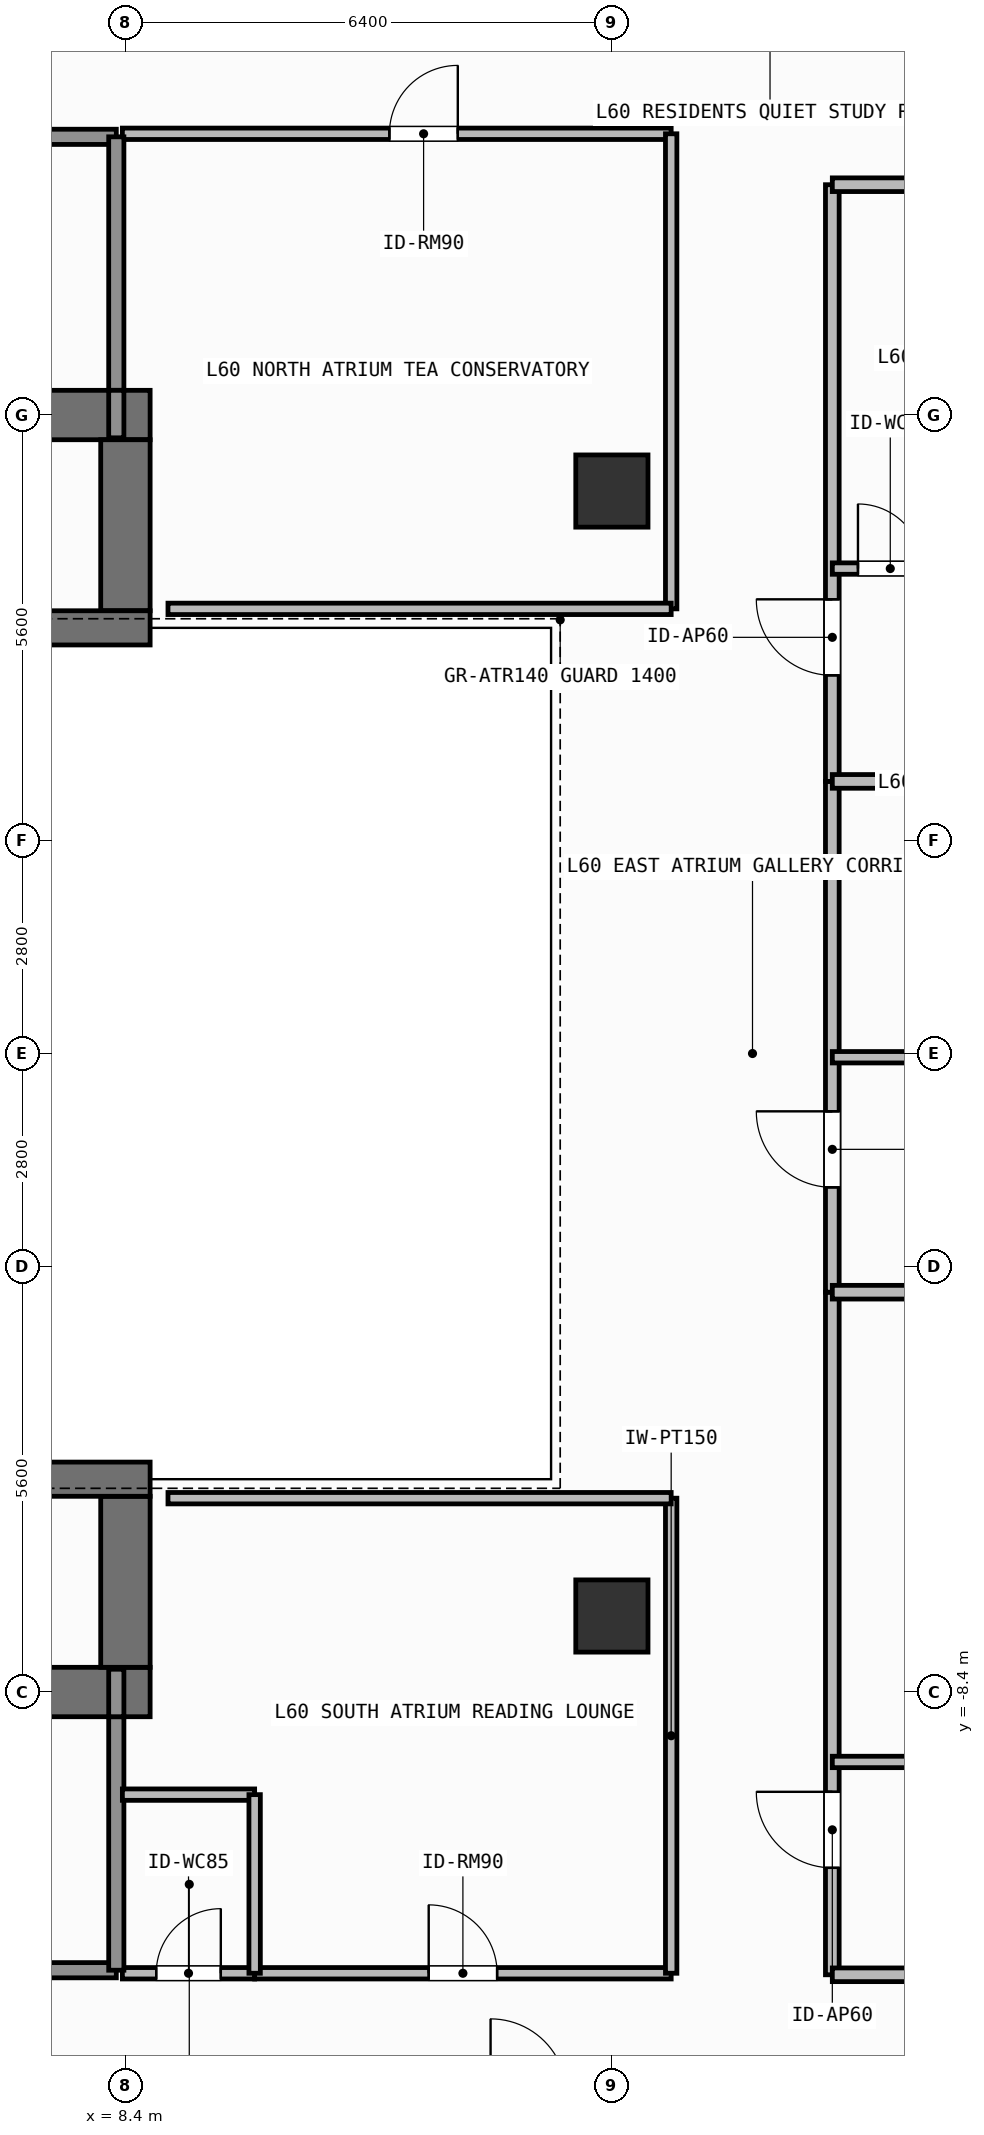
"""IFC4 building model, lengths in metres.
Left out: names, types, materials, properties, quantities, classifications, styles, units other than length and angle.
Written with IfcOpenShell. Run it as: python <this file> out.ifc"""

import sys

from ifc_helpers import new_model, si_unit, direction, frame, frame_2d, origin, origin_2d, place, context, subcontext, project, spatial, rectangle, extrude, element, fill, save


model = new_model("IFC4")
c1 = context("Model", 3, precision=1e-05, world=origin(), true_north=direction((0.0, 1.0)))
c2 = subcontext(c1, "Body", "Model", "MODEL_VIEW")
j1 = project(units=[si_unit("LENGTHUNIT", "METRE"), si_unit("PLANEANGLEUNIT", "RADIAN")], contexts=[c1])
p1 = place(None, origin())
s1 = spatial("IfcSite", under=j1, at=p1, CompositionType="ELEMENT")
p2 = place(p1, origin())
s2 = spatial("IfcBuilding", under=s1, at=p2, CompositionType="ELEMENT")
p3 = place(p2, frame((0.0, 0.0, 246.9)))
s3 = spatial("IfcBuildingStorey", under=s2, at=p3, CompositionType="ELEMENT", Elevation=246.9)
p4 = place(p3, frame((6.12, -8.4, 0.0), z_axis=(0.0, 0.0, 1.0), x_axis=(1.0, 0.0, 0.0)))
e1 = element("IfcWall", 1, at=p4, inside=s3, PredefinedType="SHEAR", context=c2, shape_type="SweptSolid", body=[
    extrude(rectangle(XDim=2.605, YDim=0.65, at=frame_2d((1.302, 0.0))), origin(), (0.0, 0.0, 1.0), 3.9),
])
p5 = place(p3, frame((-7.55, 8.4, 0.0), z_axis=(0.0, 0.0, 1.0), x_axis=(1.0, 0.0, 0.0)))
e2 = element("IfcWall", 2, at=p5, inside=s3, PredefinedType="SHEAR", context=c2, shape_type="SweptSolid", body=[
    extrude(rectangle(XDim=16.275, YDim=0.65, at=frame_2d((8.138, 0.0))), origin(), (0.0, 0.0, 1.0), 3.9),
])
for number, where, z_axis, x_axis in (
    (3, (8.4, -8.075, 0.0), (0.0, 0.0, 1.0), (0.0, 1.0, 0.0)),
    (4, (8.4, 5.825, 0.0), (0.0, 0.0, 1.0), (0.0, 1.0, 0.0)),
):
    element("IfcWall", number, at=place(p3, frame(where, z_axis=z_axis, x_axis=x_axis)), inside=s3, PredefinedType="SHEAR", context=c2, shape_type="SweptSolid", body=[
        extrude(rectangle(XDim=2.25, YDim=0.65, at=frame_2d((1.125, 0.0))), origin(), (0.0, 0.0, 1.0), 3.9),
    ])
for number, where, z_axis, x_axis in (
    (5, (3.045, -5.6, 0.0), (0.0, 0.0, 1.0), (1.0, 0.0, 0.0)),
    (6, (3.045, 5.6, 0.0), (0.0, 0.0, 1.0), (1.0, 0.0, 0.0)),
):
    element("IfcWall", number, at=place(p3, frame(where, z_axis=z_axis, x_axis=x_axis)), inside=s3, PredefinedType="SHEAR", context=c2, shape_type="SweptSolid", body=[
        extrude(rectangle(XDim=5.68, YDim=0.45, at=frame_2d((2.84, 0.0))), origin(), (0.0, 0.0, 1.0), 3.9),
    ])
for number, where, z_axis, x_axis in (
    (7, (14.8, -7.4, 0.0), (0.0, 0.0, 1.0), (1.0, 0.0, 0.0)),
    (8, (14.8, 7.4, 0.0), (0.0, 0.0, 1.0), (1.0, 0.0, 0.0)),
):
    element("IfcColumn", number, at=place(p3, frame(where, z_axis=z_axis, x_axis=x_axis)), inside=s3, PredefinedType="COLUMN", context=c2, shape_type="SweptSolid", body=[
        extrude(rectangle(XDim=0.95, YDim=0.95, at=origin_2d()), origin(), (0.0, 0.0, 1.0), 3.9),
    ])
p6 = place(p3, frame((4.58, -12.06, 0.0), z_axis=(0.0, 0.0, 1.0), x_axis=(1.0, 0.0, 0.0)))
e9 = element("IfcWall", 9, at=p6, inside=s3, PredefinedType="SOLIDWALL", context=c2, shape_type="SweptSolid", body=[
    extrude(rectangle(XDim=3.7, YDim=0.2, at=frame_2d((1.85, 0.0))), origin(), (0.0, 0.0, 1.0), 3.68),
])
p7 = place(p6, frame((1.212, 0.0, 0.0)))
e10 = element("IfcOpeningElement", 10, at=p7, cuts=e9, PredefinedType="OPENING", context=c2, shape_type="SweptSolid", body=[
    extrude(rectangle(XDim=1.1, YDim=2.15, at=frame_2d((0.55, 1.075))), frame((0.0, 0.11, 0.0), z_axis=(0.0, -1.0, 0.0), x_axis=(1.0, 0.0, 0.0)), (0.0, 0.0, 1.0), 0.22),
])
p8 = place(p3, frame((4.58, 12.06, 0.0), z_axis=(0.0, 0.0, 1.0), x_axis=(1.0, 0.0, 0.0)))
e11 = element("IfcWall", 11, at=p8, inside=s3, PredefinedType="SOLIDWALL", context=c2, shape_type="SweptSolid", body=[
    extrude(rectangle(XDim=3.7, YDim=0.2, at=frame_2d((1.85, 0.0))), origin(), (0.0, 0.0, 1.0), 3.68),
])
p9 = place(p8, frame((1.212, 0.0, 0.0)))
e12 = element("IfcOpeningElement", 12, at=p9, cuts=e11, PredefinedType="OPENING", context=c2, shape_type="SweptSolid", body=[
    extrude(rectangle(XDim=1.1, YDim=2.15, at=frame_2d((0.55, 1.075))), frame((0.0, 0.11, 0.0), z_axis=(0.0, -1.0, 0.0), x_axis=(1.0, 0.0, 0.0)), (0.0, 0.0, 1.0), 0.22),
])
p10 = place(p3, frame((8.36, -12.1, 0.0), z_axis=(0.0, 0.0, 1.0), x_axis=(1.0, 0.0, 0.0)))
e13 = element("IfcWall", 13, at=p10, inside=s3, PredefinedType="PARTITIONING", context=c2, shape_type="SweptSolid", body=[
    extrude(rectangle(XDim=1.74, YDim=0.15, at=frame_2d((0.87, 0.0))), origin(), (0.0, 0.0, 1.0), 3.68),
])
p11 = place(p10, frame((0.445, 0.0, 0.0)))
e14 = element("IfcOpeningElement", 14, at=p11, cuts=e13, PredefinedType="OPENING", context=c2, shape_type="SweptSolid", body=[
    extrude(rectangle(XDim=0.85, YDim=2.1, at=frame_2d((0.425, 1.05))), frame((0.0, 0.085, 0.0), z_axis=(0.0, -1.0, 0.0), x_axis=(1.0, 0.0, 0.0)), (0.0, 0.0, 1.0), 0.17),
])
p12 = place(p3, frame((10.1, -12.1, 0.0), z_axis=(0.0, 0.0, 1.0), x_axis=(1.0, 0.0, 0.0)))
e15 = element("IfcWall", 15, at=p12, inside=s3, PredefinedType="PARTITIONING", context=c2, shape_type="SweptSolid", body=[
    extrude(rectangle(XDim=5.48, YDim=0.15, at=frame_2d((2.74, 0.0))), origin(), (0.0, 0.0, 1.0), 3.68),
])
p13 = place(p12, frame((2.29, 0.0, 0.0)))
e16 = element("IfcOpeningElement", 16, at=p13, cuts=e15, PredefinedType="OPENING", context=c2, shape_type="SweptSolid", body=[
    extrude(rectangle(XDim=0.9, YDim=2.1, at=frame_2d((0.45, 1.05))), frame((0.0, 0.085, 0.0), z_axis=(0.0, -1.0, 0.0), x_axis=(1.0, 0.0, 0.0)), (0.0, 0.0, 1.0), 0.17),
])
p14 = place(p3, frame((8.36, 12.1, 0.0), z_axis=(0.0, 0.0, 1.0), x_axis=(1.0, 0.0, 0.0)))
e17 = element("IfcWall", 17, at=p14, inside=s3, PredefinedType="PARTITIONING", context=c2, shape_type="SweptSolid", body=[
    extrude(rectangle(XDim=7.22, YDim=0.15, at=frame_2d((3.61, 0.0))), origin(), (0.0, 0.0, 1.0), 3.68),
])
p15 = place(p14, frame((3.513, 0.0, 0.0)))
e18 = element("IfcOpeningElement", 18, at=p15, cuts=e17, PredefinedType="OPENING", context=c2, shape_type="SweptSolid", body=[
    extrude(rectangle(XDim=0.9, YDim=2.1, at=frame_2d((0.45, 1.05))), frame((0.0, 0.085, 0.0), z_axis=(0.0, -1.0, 0.0), x_axis=(1.0, 0.0, 0.0)), (0.0, 0.0, 1.0), 0.17),
])
p16 = place(p3, frame((17.7, -12.12, 0.0), z_axis=(0.0, 0.0, 1.0), x_axis=(0.0, 1.0, 0.0)))
e19 = element("IfcWall", 19, at=p16, inside=s3, PredefinedType="PARTITIONING", context=c2, shape_type="SweptSolid", body=[
    extrude(rectangle(XDim=8.98, YDim=0.18, at=frame_2d((4.49, 0.0))), origin(), (0.0, 0.0, 1.0), 3.68),
])
p17 = place(p16, frame((1.407, 0.0, 0.0)))
e20 = element("IfcOpeningElement", 20, at=p17, cuts=e19, PredefinedType="OPENING", context=c2, shape_type="SweptSolid", body=[
    extrude(rectangle(XDim=1.0, YDim=2.2, at=frame_2d((0.5, 1.1))), frame((0.0, 0.1, 0.0), z_axis=(0.0, -1.0, 0.0), x_axis=(1.0, 0.0, 0.0)), (0.0, 0.0, 1.0), 0.2),
])
p18 = place(p3, frame((17.7, -9.32, 0.0), z_axis=(0.0, 0.0, 1.0), x_axis=(1.0, 0.0, 0.0)))
e21 = element("IfcWall", 21, at=p18, inside=s3, PredefinedType="PARTITIONING", context=c2, shape_type="SweptSolid", body=[
    extrude(rectangle(XDim=3.369, YDim=0.15, at=frame_2d((1.685, 0.0))), origin(), (0.0, 0.0, 1.0), 3.68),
])
p19 = place(p18, frame((1.175, 0.0, 0.0)))
e22 = element("IfcOpeningElement", 22, at=p19, cuts=e21, PredefinedType="OPENING", context=c2, shape_type="SweptSolid", body=[
    extrude(rectangle(XDim=0.85, YDim=2.1, at=frame_2d((0.425, 1.05))), frame((0.0, 0.085, 0.0), z_axis=(0.0, -1.0, 0.0), x_axis=(1.0, 0.0, 0.0)), (0.0, 0.0, 1.0), 0.17),
])
p20 = place(p3, frame((17.7, -3.14, 0.0), z_axis=(0.0, 0.0, 1.0), x_axis=(0.0, 1.0, 0.0)))
e23 = element("IfcWall", 23, at=p20, inside=s3, PredefinedType="PARTITIONING", context=c2, shape_type="SweptSolid", body=[
    extrude(rectangle(XDim=6.72, YDim=0.18, at=frame_2d((3.36, 0.0))), origin(), (0.0, 0.0, 1.0), 3.68),
])
p21 = place(p20, frame((1.379, 0.0, 0.0)))
e24 = element("IfcOpeningElement", 24, at=p21, cuts=e23, PredefinedType="OPENING", context=c2, shape_type="SweptSolid", body=[
    extrude(rectangle(XDim=1.0, YDim=2.2, at=frame_2d((0.5, 1.1))), frame((0.0, 0.1, 0.0), z_axis=(0.0, -1.0, 0.0), x_axis=(1.0, 0.0, 0.0)), (0.0, 0.0, 1.0), 0.2),
])
p22 = place(p3, frame((17.7, -0.049, 0.0), z_axis=(0.0, 0.0, 1.0), x_axis=(1.0, 0.0, 0.0)))
e25 = element("IfcWall", 25, at=p22, inside=s3, PredefinedType="PARTITIONING", context=c2, shape_type="SweptSolid", body=[
    extrude(rectangle(XDim=3.487, YDim=0.15, at=frame_2d((1.744, 0.0))), origin(), (0.0, 0.0, 1.0), 3.68),
])
p23 = place(p22, frame((1.229, 0.0, 0.0)))
e26 = element("IfcOpeningElement", 26, at=p23, cuts=e25, PredefinedType="OPENING", context=c2, shape_type="SweptSolid", body=[
    extrude(rectangle(XDim=0.85, YDim=2.1, at=frame_2d((0.425, 1.05))), frame((0.0, 0.085, 0.0), z_axis=(0.0, -1.0, 0.0), x_axis=(1.0, 0.0, 0.0)), (0.0, 0.0, 1.0), 0.17),
])
p24 = place(p3, frame((17.7, 3.58, 0.0), z_axis=(0.0, 0.0, 1.0), x_axis=(0.0, 1.0, 0.0)))
e27 = element("IfcWall", 27, at=p24, inside=s3, PredefinedType="PARTITIONING", context=c2, shape_type="SweptSolid", body=[
    extrude(rectangle(XDim=7.85, YDim=0.18, at=frame_2d((3.925, 0.0))), origin(), (0.0, 0.0, 1.0), 3.68),
])
p25 = place(p24, frame((1.396, 0.0, 0.0)))
e28 = element("IfcOpeningElement", 28, at=p25, cuts=e27, PredefinedType="OPENING", context=c2, shape_type="SweptSolid", body=[
    extrude(rectangle(XDim=1.0, YDim=2.2, at=frame_2d((0.5, 1.1))), frame((0.0, 0.1, 0.0), z_axis=(0.0, -1.0, 0.0), x_axis=(1.0, 0.0, 0.0)), (0.0, 0.0, 1.0), 0.2),
])
p26 = place(p3, frame((17.7, 6.38, 0.0), z_axis=(0.0, 0.0, 1.0), x_axis=(1.0, 0.0, 0.0)))
e29 = element("IfcWall", 29, at=p26, inside=s3, PredefinedType="PARTITIONING", context=c2, shape_type="SweptSolid", body=[
    extrude(rectangle(XDim=3.478, YDim=0.15, at=frame_2d((1.739, 0.0))), origin(), (0.0, 0.0, 1.0), 3.68),
])
p27 = place(p26, frame((0.337, 0.0, 0.0)))
e30 = element("IfcOpeningElement", 30, at=p27, cuts=e29, PredefinedType="OPENING", context=c2, shape_type="SweptSolid", body=[
    extrude(rectangle(XDim=0.85, YDim=2.1, at=frame_2d((0.425, 1.05))), frame((0.0, 0.085, 0.0), z_axis=(0.0, -1.0, 0.0), x_axis=(1.0, 0.0, 0.0)), (0.0, 0.0, 1.0), 0.17),
])
for number, where, z_axis, x_axis in (
    (31, (8.28, -12.06, 0.0), (0.0, 0.0, 1.0), (0.0, 1.0, 0.0)),
    (32, (8.28, 8.725, 0.0), (0.0, 0.0, 1.0), (0.0, 1.0, 0.0)),
):
    element("IfcWall", number, at=place(p3, frame(where, z_axis=z_axis, x_axis=x_axis)), inside=s3, PredefinedType="SOLIDWALL", context=c2, shape_type="SweptSolid", body=[
        extrude(rectangle(XDim=3.335, YDim=0.2, at=frame_2d((1.667, 0.0))), origin(), (0.0, 0.0, 1.0), 3.68),
    ])
p28 = place(p3, frame((8.28, -8.725, 0.0), z_axis=(0.0, 0.0, 1.0), x_axis=(0.0, 1.0, 0.0)))
e33 = element("IfcWall", 33, at=p28, inside=s3, PredefinedType="SOLIDWALL", context=c2, shape_type="SweptSolid", body=[
    extrude(rectangle(XDim=0.625, YDim=0.2, at=frame_2d((0.312, 0.0))), origin(), (0.0, 0.0, 1.0), 3.68),
])
p29 = place(p3, frame((8.36, -9.75, 0.0), z_axis=(0.0, 0.0, 1.0), x_axis=(1.0, 0.0, 0.0)))
e34 = element("IfcWall", 34, at=p29, inside=s3, PredefinedType="PARTITIONING", context=c2, shape_type="SweptSolid", body=[
    extrude(rectangle(XDim=1.74, YDim=0.15, at=frame_2d((0.87, 0.0))), origin(), (0.0, 0.0, 1.0), 3.68),
])
p30 = place(p3, frame((10.1, -12.1, 0.0), z_axis=(0.0, 0.0, 1.0), x_axis=(0.0, 1.0, 0.0)))
e35 = element("IfcWall", 35, at=p30, inside=s3, PredefinedType="PARTITIONING", context=c2, shape_type="SweptSolid", body=[
    extrude(rectangle(XDim=2.35, YDim=0.15, at=frame_2d((1.175, 0.0))), origin(), (0.0, 0.0, 1.0), 3.68),
])
p31 = place(p3, frame((15.58, -12.1, 0.0), z_axis=(0.0, 0.0, 1.0), x_axis=(0.0, 1.0, 0.0)))
e36 = element("IfcWall", 36, at=p31, inside=s3, PredefinedType="PARTITIONING", context=c2, shape_type="SweptSolid", body=[
    extrude(rectangle(XDim=6.25, YDim=0.15, at=frame_2d((3.125, 0.0))), origin(), (0.0, 0.0, 1.0), 3.68),
])
p32 = place(p3, frame((8.96, -5.85, 0.0), z_axis=(0.0, 0.0, 1.0), x_axis=(1.0, 0.0, 0.0)))
e37 = element("IfcWall", 37, at=p32, inside=s3, PredefinedType="PARTITIONING", context=c2, shape_type="SweptSolid", body=[
    extrude(rectangle(XDim=6.62, YDim=0.15, at=frame_2d((3.31, 0.0))), origin(), (0.0, 0.0, 1.0), 3.68),
])
p33 = place(p3, frame((8.28, 8.1, 0.0), z_axis=(0.0, 0.0, 1.0), x_axis=(0.0, 1.0, 0.0)))
e38 = element("IfcWall", 38, at=p33, inside=s3, PredefinedType="SOLIDWALL", context=c2, shape_type="SweptSolid", body=[
    extrude(rectangle(XDim=0.625, YDim=0.2, at=frame_2d((0.312, 0.0))), origin(), (0.0, 0.0, 1.0), 3.68),
])
p34 = place(p3, frame((15.58, 5.85, 0.0), z_axis=(0.0, 0.0, 1.0), x_axis=(0.0, 1.0, 0.0)))
e39 = element("IfcWall", 39, at=p34, inside=s3, PredefinedType="PARTITIONING", context=c2, shape_type="SweptSolid", body=[
    extrude(rectangle(XDim=6.25, YDim=0.15, at=frame_2d((3.125, 0.0))), origin(), (0.0, 0.0, 1.0), 3.68),
])
p35 = place(p3, frame((8.96, 5.85, 0.0), z_axis=(0.0, 0.0, 1.0), x_axis=(1.0, 0.0, 0.0)))
e40 = element("IfcWall", 40, at=p35, inside=s3, PredefinedType="PARTITIONING", context=c2, shape_type="SweptSolid", body=[
    extrude(rectangle(XDim=6.62, YDim=0.15, at=frame_2d((3.31, 0.0))), origin(), (0.0, 0.0, 1.0), 3.68),
])
for number, where, z_axis, x_axis in (
    (41, (17.7, -3.14, 0.0), (0.0, 0.0, 1.0), (1.0, 0.0, 0.0)),
    (42, (17.7, 3.58, 0.0), (0.0, 0.0, 1.0), (1.0, 0.0, 0.0)),
    (43, (17.7, -12.12, 0.0), (0.0, 0.0, 1.0), (1.0, 0.0, 0.0)),
):
    element("IfcWall", number, at=place(p3, frame(where, z_axis=z_axis, x_axis=x_axis)), inside=s3, PredefinedType="PARTITIONING", context=c2, shape_type="SweptSolid", body=[
        extrude(rectangle(XDim=8.43, YDim=0.18, at=frame_2d((4.215, 0.0))), origin(), (0.0, 0.0, 1.0), 3.68),
    ])
p36 = place(p3, frame((17.7, 11.43, 0.0), z_axis=(0.0, 0.0, 1.0), x_axis=(1.0, 0.0, 0.0)))
e44 = element("IfcWall", 44, at=p36, inside=s3, PredefinedType="PARTITIONING", context=c2, shape_type="SweptSolid", body=[
    extrude(rectangle(XDim=8.43, YDim=0.18, at=frame_2d((4.215, 0.0))), origin(), (0.0, 0.0, 1.0), 3.42),
])
p37 = place(p11, origin())
e45 = element("IfcDoor", 45, at=p37, inside=s3, OperationType="SINGLE_SWING_RIGHT", PredefinedType="DOOR", context=c2, shape_type="SweptSolid", body=[
    extrude(rectangle(XDim=0.85, YDim=2.1, at=frame_2d((0.425, 1.05))), frame((0.0, 0.025, 0.0), z_axis=(0.0, -1.0, 0.0), x_axis=(1.0, 0.0, 0.0)), (0.0, 0.0, 1.0), 0.05),
])
fill(e14, e45)
p38 = place(p13, origin())
e46 = element("IfcDoor", 46, at=p38, inside=s3, OperationType="SINGLE_SWING_LEFT", PredefinedType="DOOR", context=c2, shape_type="SweptSolid", body=[
    extrude(rectangle(XDim=0.9, YDim=2.1, at=frame_2d((0.45, 1.05))), frame((0.0, 0.025, 0.0), z_axis=(0.0, -1.0, 0.0), x_axis=(1.0, 0.0, 0.0)), (0.0, 0.0, 1.0), 0.05),
])
fill(e16, e46)
p39 = place(p15, origin())
e47 = element("IfcDoor", 47, at=p39, inside=s3, OperationType="SINGLE_SWING_RIGHT", PredefinedType="DOOR", context=c2, shape_type="SweptSolid", body=[
    extrude(rectangle(XDim=0.9, YDim=2.1, at=frame_2d((0.45, 1.05))), frame((0.0, 0.025, 0.0), z_axis=(0.0, -1.0, 0.0), x_axis=(1.0, 0.0, 0.0)), (0.0, 0.0, 1.0), 0.05),
])
fill(e18, e47)
p40 = place(p17, origin())
e48 = element("IfcDoor", 48, at=p40, inside=s3, OperationType="SINGLE_SWING_RIGHT", PredefinedType="DOOR", context=c2, shape_type="SweptSolid", body=[
    extrude(rectangle(XDim=1.0, YDim=2.2, at=frame_2d((0.5, 1.1))), frame((0.0, 0.025, 0.0), z_axis=(0.0, -1.0, 0.0), x_axis=(1.0, 0.0, 0.0)), (0.0, 0.0, 1.0), 0.05),
])
fill(e20, e48)
p41 = place(p21, origin())
e49 = element("IfcDoor", 49, at=p41, inside=s3, OperationType="SINGLE_SWING_RIGHT", PredefinedType="DOOR", context=c2, shape_type="SweptSolid", body=[
    extrude(rectangle(XDim=1.0, YDim=2.2, at=frame_2d((0.5, 1.1))), frame((0.0, 0.025, 0.0), z_axis=(0.0, -1.0, 0.0), x_axis=(1.0, 0.0, 0.0)), (0.0, 0.0, 1.0), 0.05),
])
fill(e24, e49)
p42 = place(p25, origin())
e50 = element("IfcDoor", 50, at=p42, inside=s3, OperationType="SINGLE_SWING_RIGHT", PredefinedType="DOOR", context=c2, shape_type="SweptSolid", body=[
    extrude(rectangle(XDim=1.0, YDim=2.2, at=frame_2d((0.5, 1.1))), frame((0.0, 0.025, 0.0), z_axis=(0.0, -1.0, 0.0), x_axis=(1.0, 0.0, 0.0)), (0.0, 0.0, 1.0), 0.05),
])
fill(e28, e50)
p43 = place(p27, origin())
e51 = element("IfcDoor", 51, at=p43, inside=s3, OperationType="SINGLE_SWING_LEFT", PredefinedType="DOOR", context=c2, shape_type="SweptSolid", body=[
    extrude(rectangle(XDim=0.85, YDim=2.1, at=frame_2d((0.425, 1.05))), frame((0.0, 0.025, 0.0), z_axis=(0.0, -1.0, 0.0), x_axis=(1.0, 0.0, 0.0)), (0.0, 0.0, 1.0), 0.05),
])
fill(e30, e51)
save(model, sys.argv[1])
